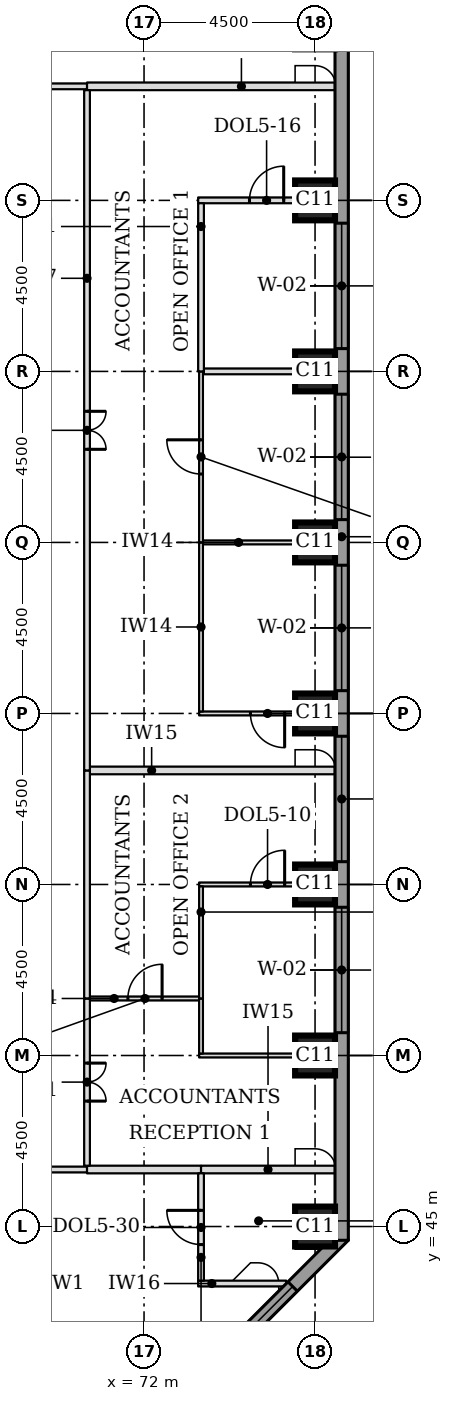
"""IFC4 building model, lengths in metres.
Left out: names, types, materials, properties, quantities, classifications, styles, units other than length and angle.
Written with IfcOpenShell. Run it as: python <this file> out.ifc"""

import sys

from ifc_helpers import new_model, si_unit, direction, frame, frame_2d, origin, origin_2d, place, context, subcontext, project, spatial, rectangle, extrude, element, fill, save


model = new_model("IFC4")
c1 = context("Model", 3, precision=1e-05, world=origin(), true_north=direction((0.0, 1.0)))
c2 = subcontext(c1, "Body", "Model", "MODEL_VIEW")
j1 = project(units=[si_unit("LENGTHUNIT", "METRE"), si_unit("PLANEANGLEUNIT", "RADIAN")], contexts=[c1])
p1 = place(None, origin())
s1 = spatial("IfcSite", under=j1, at=p1, CompositionType="ELEMENT")
p2 = place(p1, origin())
s2 = spatial("IfcBuilding", under=s1, at=p2, CompositionType="ELEMENT")
p3 = place(p2, frame((0.0, 0.0, 112.2)))
s3 = spatial("IfcBuildingStorey", under=s2, at=p3, CompositionType="ELEMENT", Elevation=112.2)
for number, where, z_axis, x_axis in (
    (1, (76.5, 45.0, 0.0), (0.0, 0.0, 1.0), (1.0, 0.0, 0.0)),
    (2, (76.5, 49.5, 0.0), (0.0, 0.0, 1.0), (1.0, 0.0, 0.0)),
    (3, (76.5, 54.0, 0.0), (0.0, 0.0, 1.0), (1.0, 0.0, 0.0)),
    (4, (76.5, 58.5, 0.0), (0.0, 0.0, 1.0), (1.0, 0.0, 0.0)),
    (5, (76.5, 63.0, 0.0), (0.0, 0.0, 1.0), (1.0, 0.0, 0.0)),
    (6, (76.5, 67.5, 0.0), (0.0, 0.0, 1.0), (1.0, 0.0, 0.0)),
    (7, (76.5, 72.0, 0.0), (0.0, 0.0, 1.0), (1.0, 0.0, 0.0)),
):
    element("IfcColumn", number, at=place(p3, frame(where, z_axis=z_axis, x_axis=x_axis)), inside=s3, PredefinedType="COLUMN", context=c2, shape_type="SweptSolid", body=[
        extrude(rectangle(XDim=1.05, YDim=1.05, at=origin_2d()), origin(), (0.0, 0.0, 1.0), 3.7),
    ])
p4 = place(p3, frame((72.239, 39.749, 0.0), z_axis=(0.0, 0.0, 1.0), x_axis=(0.707106781187, 0.707106781187, 0.0)))
e8 = element("IfcWall", 8, at=p4, inside=s3, PredefinedType="STANDARD", context=c2, shape_type="SweptSolid", body=[
    extrude(rectangle(XDim=7.089, YDim=0.35, at=frame_2d((3.544, 0.0))), origin(), (0.0, 0.0, 1.0), 3.525),
])
p5 = place(p4, frame((1.894, 0.0, 0.9)))
e9 = element("IfcOpeningElement", 9, at=p5, cuts=e8, PredefinedType="OPENING", context=c2, shape_type="SweptSolid", body=[
    extrude(rectangle(XDim=3.3, YDim=1.9, at=frame_2d((1.65, 0.95))), frame((0.0, 0.185, 0.0), z_axis=(0.0, -1.0, 0.0), x_axis=(1.0, 0.0, 0.0)), (0.0, 0.0, 1.0), 0.37),
])
p6 = place(p3, frame((77.2, 44.638, 0.0), z_axis=(0.0, 0.0, 1.0), x_axis=(0.0, 1.0, 0.0)))
e10 = element("IfcWall", 10, at=p6, inside=s3, PredefinedType="STANDARD", context=c2, shape_type="SweptSolid", body=[
    extrude(rectangle(XDim=32.225, YDim=0.35, at=frame_2d((16.112, 0.0))), origin(), (0.0, 0.0, 1.0), 3.525),
])
p7 = place(p6, frame((5.462, 0.0, 0.9)))
e11 = element("IfcOpeningElement", 11, at=p7, cuts=e10, PredefinedType="OPENING", context=c2, shape_type="SweptSolid", body=[
    extrude(rectangle(XDim=3.3, YDim=1.9, at=frame_2d((1.65, 0.95))), frame((0.0, 0.185, 0.0), z_axis=(0.0, -1.0, 0.0), x_axis=(1.0, 0.0, 0.0)), (0.0, 0.0, 1.0), 0.37),
])
p8 = place(p6, frame((9.962, 0.0, 0.9)))
e12 = element("IfcOpeningElement", 12, at=p8, cuts=e10, PredefinedType="OPENING", context=c2, shape_type="SweptSolid", body=[
    extrude(rectangle(XDim=3.3, YDim=1.9, at=frame_2d((1.65, 0.95))), frame((0.0, 0.185, 0.0), z_axis=(0.0, -1.0, 0.0), x_axis=(1.0, 0.0, 0.0)), (0.0, 0.0, 1.0), 0.37),
])
p9 = place(p6, frame((14.462, 0.0, 0.9)))
e13 = element("IfcOpeningElement", 13, at=p9, cuts=e10, PredefinedType="OPENING", context=c2, shape_type="SweptSolid", body=[
    extrude(rectangle(XDim=3.3, YDim=1.9, at=frame_2d((1.65, 0.95))), frame((0.0, 0.185, 0.0), z_axis=(0.0, -1.0, 0.0), x_axis=(1.0, 0.0, 0.0)), (0.0, 0.0, 1.0), 0.37),
])
p10 = place(p6, frame((18.962, 0.0, 0.9)))
e14 = element("IfcOpeningElement", 14, at=p10, cuts=e10, PredefinedType="OPENING", context=c2, shape_type="SweptSolid", body=[
    extrude(rectangle(XDim=3.3, YDim=1.9, at=frame_2d((1.65, 0.95))), frame((0.0, 0.185, 0.0), z_axis=(0.0, -1.0, 0.0), x_axis=(1.0, 0.0, 0.0)), (0.0, 0.0, 1.0), 0.37),
])
p11 = place(p6, frame((23.462, 0.0, 0.9)))
e15 = element("IfcOpeningElement", 15, at=p11, cuts=e10, PredefinedType="OPENING", context=c2, shape_type="SweptSolid", body=[
    extrude(rectangle(XDim=3.3, YDim=1.9, at=frame_2d((1.65, 0.95))), frame((0.0, 0.185, 0.0), z_axis=(0.0, -1.0, 0.0), x_axis=(1.0, 0.0, 0.0)), (0.0, 0.0, 1.0), 0.37),
])
p12 = place(p3, frame((73.425, 43.5, 0.0), z_axis=(0.0, 0.0, 1.0), x_axis=(1.0, 0.0, 0.0)))
e16 = element("IfcWall", 16, at=p12, inside=s3, PredefinedType="PARTITIONING", context=c2, shape_type="SweptSolid", body=[
    extrude(rectangle(XDim=2.317, YDim=0.15, at=frame_2d((1.159, 0.0))), origin(), (0.0, 0.0, 1.0), 3.55),
])
p13 = place(p3, frame((54.0, 46.5, 0.0), z_axis=(0.0, 0.0, 1.0), x_axis=(1.0, 0.0, 0.0)))
e17 = element("IfcWall", 17, at=p13, inside=s3, PredefinedType="PARTITIONING", context=c2, shape_type="SweptSolid", body=[
    extrude(rectangle(XDim=16.5, YDim=0.15, at=frame_2d((8.25, 0.0))), origin(), (0.0, 0.0, 1.0), 3.55),
])
p14 = place(p3, frame((70.5, 46.5, 0.0), z_axis=(0.0, 0.0, 1.0), x_axis=(1.0, 0.0, 0.0)))
e18 = element("IfcWall", 18, at=p14, inside=s3, PredefinedType="PARTITIONING", context=c2, shape_type="SweptSolid", body=[
    extrude(rectangle(XDim=3.0, YDim=0.2, at=frame_2d((1.5, 0.0))), origin(), (0.0, 0.0, 1.0), 3.55),
])
p15 = place(p3, frame((73.5, 46.5, 0.0), z_axis=(0.0, 0.0, 1.0), x_axis=(1.0, 0.0, 0.0)))
e19 = element("IfcWall", 19, at=p15, inside=s3, PredefinedType="PARTITIONING", context=c2, shape_type="SweptSolid", body=[
    extrude(rectangle(XDim=3.525, YDim=0.2, at=frame_2d((1.762, 0.0))), origin(), (0.0, 0.0, 1.0), 3.55),
])
p16 = place(p3, frame((73.45, 49.5, 0.0), z_axis=(0.0, 0.0, 1.0), x_axis=(1.0, 0.0, 0.0)))
e20 = element("IfcWall", 20, at=p16, inside=s3, PredefinedType="PARTITIONING", context=c2, shape_type="SweptSolid", body=[
    extrude(rectangle(XDim=3.575, YDim=0.1, at=frame_2d((1.788, 0.0))), origin(), (0.0, 0.0, 1.0), 3.55),
])
p17 = place(p3, frame((70.575, 51.0, 0.0), z_axis=(0.0, 0.0, 1.0), x_axis=(1.0, 0.0, 0.0)))
e21 = element("IfcWall", 21, at=p17, inside=s3, PredefinedType="PARTITIONING", context=c2, shape_type="SweptSolid", body=[
    extrude(rectangle(XDim=2.875, YDim=0.1, at=frame_2d((1.438, 0.0))), origin(), (0.0, 0.0, 1.0), 3.022),
])
p18 = place(p17, frame((1.0, 0.0, 0.0)))
e22 = element("IfcOpeningElement", 22, at=p18, cuts=e21, PredefinedType="OPENING", context=c2, shape_type="SweptSolid", body=[
    extrude(rectangle(XDim=0.9, YDim=2.1, at=frame_2d((0.45, 1.05))), frame((0.0, 0.06, 0.0), z_axis=(0.0, -1.0, 0.0), x_axis=(1.0, 0.0, 0.0)), (0.0, 0.0, 1.0), 0.12),
])
p19 = place(p3, frame((73.45, 54.0, 0.0), z_axis=(0.0, 0.0, 1.0), x_axis=(1.0, 0.0, 0.0)))
e23 = element("IfcWall", 23, at=p19, inside=s3, PredefinedType="PARTITIONING", context=c2, shape_type="SweptSolid", body=[
    extrude(rectangle(XDim=3.575, YDim=0.1, at=frame_2d((1.788, 0.0))), origin(), (0.0, 0.0, 1.0), 3.55),
])
p20 = place(p19, frame((1.35, 0.0, 0.0)))
e24 = element("IfcOpeningElement", 24, at=p20, cuts=e23, PredefinedType="OPENING", context=c2, shape_type="SweptSolid", body=[
    extrude(rectangle(XDim=0.9, YDim=2.1, at=frame_2d((0.45, 1.05))), frame((0.0, 0.06, 0.0), z_axis=(0.0, -1.0, 0.0), x_axis=(1.0, 0.0, 0.0)), (0.0, 0.0, 1.0), 0.12),
])
p21 = place(p3, frame((70.575, 57.0, 0.0), z_axis=(0.0, 0.0, 1.0), x_axis=(1.0, 0.0, 0.0)))
e25 = element("IfcWall", 25, at=p21, inside=s3, PredefinedType="PARTITIONING", context=c2, shape_type="SweptSolid", body=[
    extrude(rectangle(XDim=6.45, YDim=0.2, at=frame_2d((3.225, 0.0))), origin(), (0.0, 0.0, 1.0), 3.55),
])
p22 = place(p3, frame((73.45, 58.5, 0.0), z_axis=(0.0, 0.0, 1.0), x_axis=(1.0, 0.0, 0.0)))
e26 = element("IfcWall", 26, at=p22, inside=s3, PredefinedType="PARTITIONING", context=c2, shape_type="SweptSolid", body=[
    extrude(rectangle(XDim=3.575, YDim=0.1, at=frame_2d((1.788, 0.0))), origin(), (0.0, 0.0, 1.0), 3.55),
])
p23 = place(p22, frame((1.35, 0.0, 0.0)))
e27 = element("IfcOpeningElement", 27, at=p23, cuts=e26, PredefinedType="OPENING", context=c2, shape_type="SweptSolid", body=[
    extrude(rectangle(XDim=0.9, YDim=2.1, at=frame_2d((0.45, 1.05))), frame((0.0, 0.06, 0.0), z_axis=(0.0, -1.0, 0.0), x_axis=(1.0, 0.0, 0.0)), (0.0, 0.0, 1.0), 0.12),
])
p24 = place(p3, frame((73.55, 63.0, 0.0), z_axis=(0.0, 0.0, 1.0), x_axis=(1.0, 0.0, 0.0)))
e28 = element("IfcWall", 28, at=p24, inside=s3, PredefinedType="PARTITIONING", context=c2, shape_type="SweptSolid", body=[
    extrude(rectangle(XDim=3.475, YDim=0.1, at=frame_2d((1.737, 0.0))), origin(), (0.0, 0.0, 1.0), 3.55),
])
p25 = place(p3, frame((73.575, 67.5, 0.0), z_axis=(0.0, 0.0, 1.0), x_axis=(1.0, 0.0, 0.0)))
e29 = element("IfcWall", 29, at=p25, inside=s3, PredefinedType="PARTITIONING", context=c2, shape_type="SweptSolid", body=[
    extrude(rectangle(XDim=3.45, YDim=0.15, at=frame_2d((1.725, 0.0))), origin(), (0.0, 0.0, 1.0), 3.55),
])
p26 = place(p3, frame((73.425, 72.0, 0.0), z_axis=(0.0, 0.0, 1.0), x_axis=(1.0, 0.0, 0.0)))
e30 = element("IfcWall", 30, at=p26, inside=s3, PredefinedType="PARTITIONING", context=c2, shape_type="SweptSolid", body=[
    extrude(rectangle(XDim=3.6, YDim=0.15, at=frame_2d((1.8, 0.0))), origin(), (0.0, 0.0, 1.0), 3.55),
])
p27 = place(p26, frame((1.35, 0.0, 0.0)))
e31 = element("IfcOpeningElement", 31, at=p27, cuts=e30, PredefinedType="OPENING", context=c2, shape_type="SweptSolid", body=[
    extrude(rectangle(XDim=0.9, YDim=2.1, at=frame_2d((0.45, 1.05))), frame((0.0, 0.085, 0.0), z_axis=(0.0, -1.0, 0.0), x_axis=(1.0, 0.0, 0.0)), (0.0, 0.0, 1.0), 0.17),
])
p28 = place(p3, frame((63.0, 75.0, 0.0), z_axis=(0.0, 0.0, 1.0), x_axis=(1.0, 0.0, 0.0)))
e32 = element("IfcWall", 32, at=p28, inside=s3, PredefinedType="PARTITIONING", context=c2, shape_type="SweptSolid", body=[
    extrude(rectangle(XDim=7.5, YDim=0.15, at=frame_2d((3.75, 0.0))), origin(), (0.0, 0.0, 1.0), 3.55),
])
p29 = place(p28, frame((3.25, 0.0, 0.0)))
e33 = element("IfcOpeningElement", 33, at=p29, cuts=e32, PredefinedType="OPENING", context=c2, shape_type="SweptSolid", body=[
    extrude(rectangle(XDim=1.0, YDim=2.1, at=frame_2d((0.5, 1.05))), frame((0.0, 0.085, 0.0), z_axis=(0.0, -1.0, 0.0), x_axis=(1.0, 0.0, 0.0)), (0.0, 0.0, 1.0), 0.17),
])
p30 = place(p3, frame((70.5, 75.0, 0.0), z_axis=(0.0, 0.0, 1.0), x_axis=(1.0, 0.0, 0.0)))
e34 = element("IfcWall", 34, at=p30, inside=s3, PredefinedType="PARTITIONING", context=c2, shape_type="SweptSolid", body=[
    extrude(rectangle(XDim=6.525, YDim=0.2, at=frame_2d((3.262, 0.0))), origin(), (0.0, 0.0, 1.0), 3.55),
])
p31 = place(p3, frame((73.5, 43.575, 0.0), z_axis=(0.0, 0.0, 1.0), x_axis=(0.0, 1.0, 0.0)))
e35 = element("IfcWall", 35, at=p31, inside=s3, PredefinedType="PARTITIONING", context=c2, shape_type="SweptSolid", body=[
    extrude(rectangle(XDim=2.825, YDim=0.15, at=frame_2d((1.413, 0.0))), origin(), (0.0, 0.0, 1.0), 3.55),
])
p32 = place(p31, frame((0.95, 0.0, 0.0)))
e36 = element("IfcOpeningElement", 36, at=p32, cuts=e35, PredefinedType="OPENING", context=c2, shape_type="SweptSolid", body=[
    extrude(rectangle(XDim=0.9, YDim=2.1, at=frame_2d((0.45, 1.05))), frame((0.0, 0.085, 0.0), z_axis=(0.0, -1.0, 0.0), x_axis=(1.0, 0.0, 0.0)), (0.0, 0.0, 1.0), 0.17),
])
p33 = place(p3, frame((70.5, 46.6, 0.0), z_axis=(0.0, 0.0, 1.0), x_axis=(0.0, 1.0, 0.0)))
e37 = element("IfcWall", 37, at=p33, inside=s3, PredefinedType="PARTITIONING", context=c2, shape_type="SweptSolid", body=[
    extrude(rectangle(XDim=4.4, YDim=0.15, at=frame_2d((2.2, 0.0))), origin(), (0.0, 0.0, 1.0), 3.55),
])
p34 = place(p33, frame((1.7, 0.0, 0.0)))
e38 = element("IfcOpeningElement", 38, at=p34, cuts=e37, PredefinedType="OPENING", context=c2, shape_type="SweptSolid", body=[
    extrude(rectangle(XDim=1.0, YDim=2.1, at=frame_2d((0.5, 1.05))), frame((0.0, 0.085, 0.0), z_axis=(0.0, -1.0, 0.0), x_axis=(1.0, 0.0, 0.0)), (0.0, 0.0, 1.0), 0.17),
])
p35 = place(p3, frame((73.5, 49.55, 0.0), z_axis=(0.0, 0.0, 1.0), x_axis=(0.0, 1.0, 0.0)))
e39 = element("IfcWall", 39, at=p35, inside=s3, PredefinedType="PARTITIONING", context=c2, shape_type="SweptSolid", body=[
    extrude(rectangle(XDim=1.45, YDim=0.1, at=frame_2d((0.725, 0.0))), origin(), (0.0, 0.0, 1.0), 3.55),
])
p36 = place(p3, frame((70.5, 51.0, 0.0), z_axis=(0.0, 0.0, 1.0), x_axis=(0.0, 1.0, 0.0)))
e40 = element("IfcWall", 40, at=p36, inside=s3, PredefinedType="PARTITIONING", context=c2, shape_type="SweptSolid", body=[
    extrude(rectangle(XDim=6.0, YDim=0.15, at=frame_2d((3.0, 0.0))), origin(), (0.0, 0.0, 1.0), 3.55),
])
p37 = place(p3, frame((73.5, 51.0, 0.0), z_axis=(0.0, 0.0, 1.0), x_axis=(0.0, 1.0, 0.0)))
e41 = element("IfcWall", 41, at=p37, inside=s3, PredefinedType="PARTITIONING", context=c2, shape_type="SweptSolid", body=[
    extrude(rectangle(XDim=2.95, YDim=0.1, at=frame_2d((1.475, 0.0))), origin(), (0.0, 0.0, 1.0), 3.55),
])
p38 = place(p3, frame((70.5, 57.0, 0.0), z_axis=(0.0, 0.0, 1.0), x_axis=(0.0, 1.0, 0.0)))
e42 = element("IfcWall", 42, at=p38, inside=s3, PredefinedType="PARTITIONING", context=c2, shape_type="SweptSolid", body=[
    extrude(rectangle(XDim=17.9, YDim=0.15, at=frame_2d((8.95, 0.0))), origin(), (0.0, 0.0, 1.0), 3.55),
])
p39 = place(p38, frame((8.45, 0.0, 0.0)))
e43 = element("IfcOpeningElement", 43, at=p39, cuts=e42, PredefinedType="OPENING", context=c2, shape_type="SweptSolid", body=[
    extrude(rectangle(XDim=1.0, YDim=2.1, at=frame_2d((0.5, 1.05))), frame((0.0, 0.085, 0.0), z_axis=(0.0, -1.0, 0.0), x_axis=(1.0, 0.0, 0.0)), (0.0, 0.0, 1.0), 0.17),
])
p40 = place(p3, frame((73.5, 58.55, 0.0), z_axis=(0.0, 0.0, 1.0), x_axis=(0.0, 1.0, 0.0)))
e44 = element("IfcWall", 44, at=p40, inside=s3, PredefinedType="PARTITIONING", context=c2, shape_type="SweptSolid", body=[
    extrude(rectangle(XDim=4.45, YDim=0.1, at=frame_2d((2.225, 0.0))), origin(), (0.0, 0.0, 1.0), 3.55),
])
p41 = place(p3, frame((73.5, 63.0, 0.0), z_axis=(0.0, 0.0, 1.0), x_axis=(0.0, 1.0, 0.0)))
e45 = element("IfcWall", 45, at=p41, inside=s3, PredefinedType="PARTITIONING", context=c2, shape_type="SweptSolid", body=[
    extrude(rectangle(XDim=4.5, YDim=0.1, at=frame_2d((2.25, 0.0))), origin(), (0.0, 0.0, 1.0), 3.55),
])
p42 = place(p41, frame((1.8, 0.0, 0.0)))
e46 = element("IfcOpeningElement", 46, at=p42, cuts=e45, PredefinedType="OPENING", context=c2, shape_type="SweptSolid", body=[
    extrude(rectangle(XDim=0.9, YDim=2.1, at=frame_2d((0.45, 1.05))), frame((0.0, 0.06, 0.0), z_axis=(0.0, -1.0, 0.0), x_axis=(1.0, 0.0, 0.0)), (0.0, 0.0, 1.0), 0.12),
])
p43 = place(p3, frame((73.5, 67.5, 0.0), z_axis=(0.0, 0.0, 1.0), x_axis=(0.0, 1.0, 0.0)))
e47 = element("IfcWall", 47, at=p43, inside=s3, PredefinedType="PARTITIONING", context=c2, shape_type="SweptSolid", body=[
    extrude(rectangle(XDim=4.425, YDim=0.15, at=frame_2d((2.212, 0.0))), origin(), (0.0, 0.0, 1.0), 3.55),
])
p44 = place(p5, origin())
e48 = element("IfcWindow", 48, at=p44, inside=s3, PartitioningType="SINGLE_PANEL", PredefinedType="WINDOW", context=c2, shape_type="SweptSolid", body=[
    extrude(rectangle(XDim=3.3, YDim=1.9, at=frame_2d((1.65, 0.95))), frame((0.0, 0.085, 0.0), z_axis=(0.0, -1.0, 0.0), x_axis=(1.0, 0.0, 0.0)), (0.0, 0.0, 1.0), 0.06),
])
fill(e9, e48)
p45 = place(p7, origin())
e49 = element("IfcWindow", 49, at=p45, inside=s3, PartitioningType="SINGLE_PANEL", PredefinedType="WINDOW", context=c2, shape_type="SweptSolid", body=[
    extrude(rectangle(XDim=3.3, YDim=1.9, at=frame_2d((1.65, 0.95))), frame((0.0, 0.085, 0.0), z_axis=(0.0, -1.0, 0.0), x_axis=(1.0, 0.0, 0.0)), (0.0, 0.0, 1.0), 0.06),
])
fill(e11, e49)
p46 = place(p8, origin())
e50 = element("IfcWindow", 50, at=p46, inside=s3, PartitioningType="SINGLE_PANEL", PredefinedType="WINDOW", context=c2, shape_type="SweptSolid", body=[
    extrude(rectangle(XDim=3.3, YDim=1.9, at=frame_2d((1.65, 0.95))), frame((0.0, 0.085, 0.0), z_axis=(0.0, -1.0, 0.0), x_axis=(1.0, 0.0, 0.0)), (0.0, 0.0, 1.0), 0.06),
])
fill(e12, e50)
p47 = place(p9, origin())
e51 = element("IfcWindow", 51, at=p47, inside=s3, PartitioningType="SINGLE_PANEL", PredefinedType="WINDOW", context=c2, shape_type="SweptSolid", body=[
    extrude(rectangle(XDim=3.3, YDim=1.9, at=frame_2d((1.65, 0.95))), frame((0.0, 0.085, 0.0), z_axis=(0.0, -1.0, 0.0), x_axis=(1.0, 0.0, 0.0)), (0.0, 0.0, 1.0), 0.06),
])
fill(e13, e51)
p48 = place(p10, origin())
e52 = element("IfcWindow", 52, at=p48, inside=s3, PartitioningType="SINGLE_PANEL", PredefinedType="WINDOW", context=c2, shape_type="SweptSolid", body=[
    extrude(rectangle(XDim=3.3, YDim=1.9, at=frame_2d((1.65, 0.95))), frame((0.0, 0.085, 0.0), z_axis=(0.0, -1.0, 0.0), x_axis=(1.0, 0.0, 0.0)), (0.0, 0.0, 1.0), 0.06),
])
fill(e14, e52)
p49 = place(p11, origin())
e53 = element("IfcWindow", 53, at=p49, inside=s3, PartitioningType="SINGLE_PANEL", PredefinedType="WINDOW", context=c2, shape_type="SweptSolid", body=[
    extrude(rectangle(XDim=3.3, YDim=1.9, at=frame_2d((1.65, 0.95))), frame((0.0, 0.085, 0.0), z_axis=(0.0, -1.0, 0.0), x_axis=(1.0, 0.0, 0.0)), (0.0, 0.0, 1.0), 0.06),
])
fill(e15, e53)
p50 = place(p32, origin())
e54 = element("IfcDoor", 54, at=p50, inside=s3, OperationType="SINGLE_SWING_RIGHT", PredefinedType="DOOR", context=c2, shape_type="SweptSolid", body=[
    extrude(rectangle(XDim=0.9, YDim=2.1, at=frame_2d((0.45, 1.05))), frame((0.0, 0.025, 0.0), z_axis=(0.0, -1.0, 0.0), x_axis=(1.0, 0.0, 0.0)), (0.0, 0.0, 1.0), 0.05),
])
fill(e36, e54)
p51 = place(p34, frame((1.0, 0.0, 0.0), z_axis=(0.0, 0.0, 1.0), x_axis=(-1.0, 0.0, 0.0)))
e55 = element("IfcDoor", 55, at=p51, inside=s3, OperationType="DOUBLE_DOOR_SINGLE_SWING", PredefinedType="DOOR", context=c2, shape_type="SweptSolid", body=[
    extrude(rectangle(XDim=1.0, YDim=2.1, at=frame_2d((0.5, 1.05))), frame((0.0, 0.025, 0.0), z_axis=(0.0, -1.0, 0.0), x_axis=(1.0, 0.0, 0.0)), (0.0, 0.0, 1.0), 0.05),
])
fill(e38, e55)
p52 = place(p18, origin())
e56 = element("IfcDoor", 56, at=p52, inside=s3, OperationType="SINGLE_SWING_RIGHT", PredefinedType="DOOR", context=c2, shape_type="SweptSolid", body=[
    extrude(rectangle(XDim=0.9, YDim=2.1, at=frame_2d((0.45, 1.05))), frame((0.0, 0.025, 0.0), z_axis=(0.0, -1.0, 0.0), x_axis=(1.0, 0.0, 0.0)), (0.0, 0.0, 1.0), 0.05),
])
fill(e22, e56)
p53 = place(p20, origin())
e57 = element("IfcDoor", 57, at=p53, inside=s3, OperationType="SINGLE_SWING_RIGHT", PredefinedType="DOOR", context=c2, shape_type="SweptSolid", body=[
    extrude(rectangle(XDim=0.9, YDim=2.1, at=frame_2d((0.45, 1.05))), frame((0.0, 0.025, 0.0), z_axis=(0.0, -1.0, 0.0), x_axis=(1.0, 0.0, 0.0)), (0.0, 0.0, 1.0), 0.05),
])
fill(e24, e57)
p54 = place(p39, frame((1.0, 0.0, 0.0), z_axis=(0.0, 0.0, 1.0), x_axis=(-1.0, 0.0, 0.0)))
e58 = element("IfcDoor", 58, at=p54, inside=s3, OperationType="DOUBLE_DOOR_SINGLE_SWING", PredefinedType="DOOR", context=c2, shape_type="SweptSolid", body=[
    extrude(rectangle(XDim=1.0, YDim=2.1, at=frame_2d((0.5, 1.05))), frame((0.0, 0.025, 0.0), z_axis=(0.0, -1.0, 0.0), x_axis=(1.0, 0.0, 0.0)), (0.0, 0.0, 1.0), 0.05),
])
fill(e43, e58)
p55 = place(p23, frame((0.9, 0.0, 0.0), z_axis=(0.0, 0.0, 1.0), x_axis=(-1.0, 0.0, 0.0)))
e59 = element("IfcDoor", 59, at=p55, inside=s3, OperationType="SINGLE_SWING_LEFT", PredefinedType="DOOR", context=c2, shape_type="SweptSolid", body=[
    extrude(rectangle(XDim=0.9, YDim=2.1, at=frame_2d((0.45, 1.05))), frame((0.0, 0.025, 0.0), z_axis=(0.0, -1.0, 0.0), x_axis=(1.0, 0.0, 0.0)), (0.0, 0.0, 1.0), 0.05),
])
fill(e27, e59)
p56 = place(p42, origin())
e60 = element("IfcDoor", 60, at=p56, inside=s3, OperationType="SINGLE_SWING_RIGHT", PredefinedType="DOOR", context=c2, shape_type="SweptSolid", body=[
    extrude(rectangle(XDim=0.9, YDim=2.1, at=frame_2d((0.45, 1.05))), frame((0.0, 0.025, 0.0), z_axis=(0.0, -1.0, 0.0), x_axis=(1.0, 0.0, 0.0)), (0.0, 0.0, 1.0), 0.05),
])
fill(e46, e60)
p57 = place(p27, origin())
e61 = element("IfcDoor", 61, at=p57, inside=s3, OperationType="SINGLE_SWING_RIGHT", PredefinedType="DOOR", context=c2, shape_type="SweptSolid", body=[
    extrude(rectangle(XDim=0.9, YDim=2.1, at=frame_2d((0.45, 1.05))), frame((0.0, 0.025, 0.0), z_axis=(0.0, -1.0, 0.0), x_axis=(1.0, 0.0, 0.0)), (0.0, 0.0, 1.0), 0.05),
])
fill(e31, e61)
save(model, sys.argv[1])
